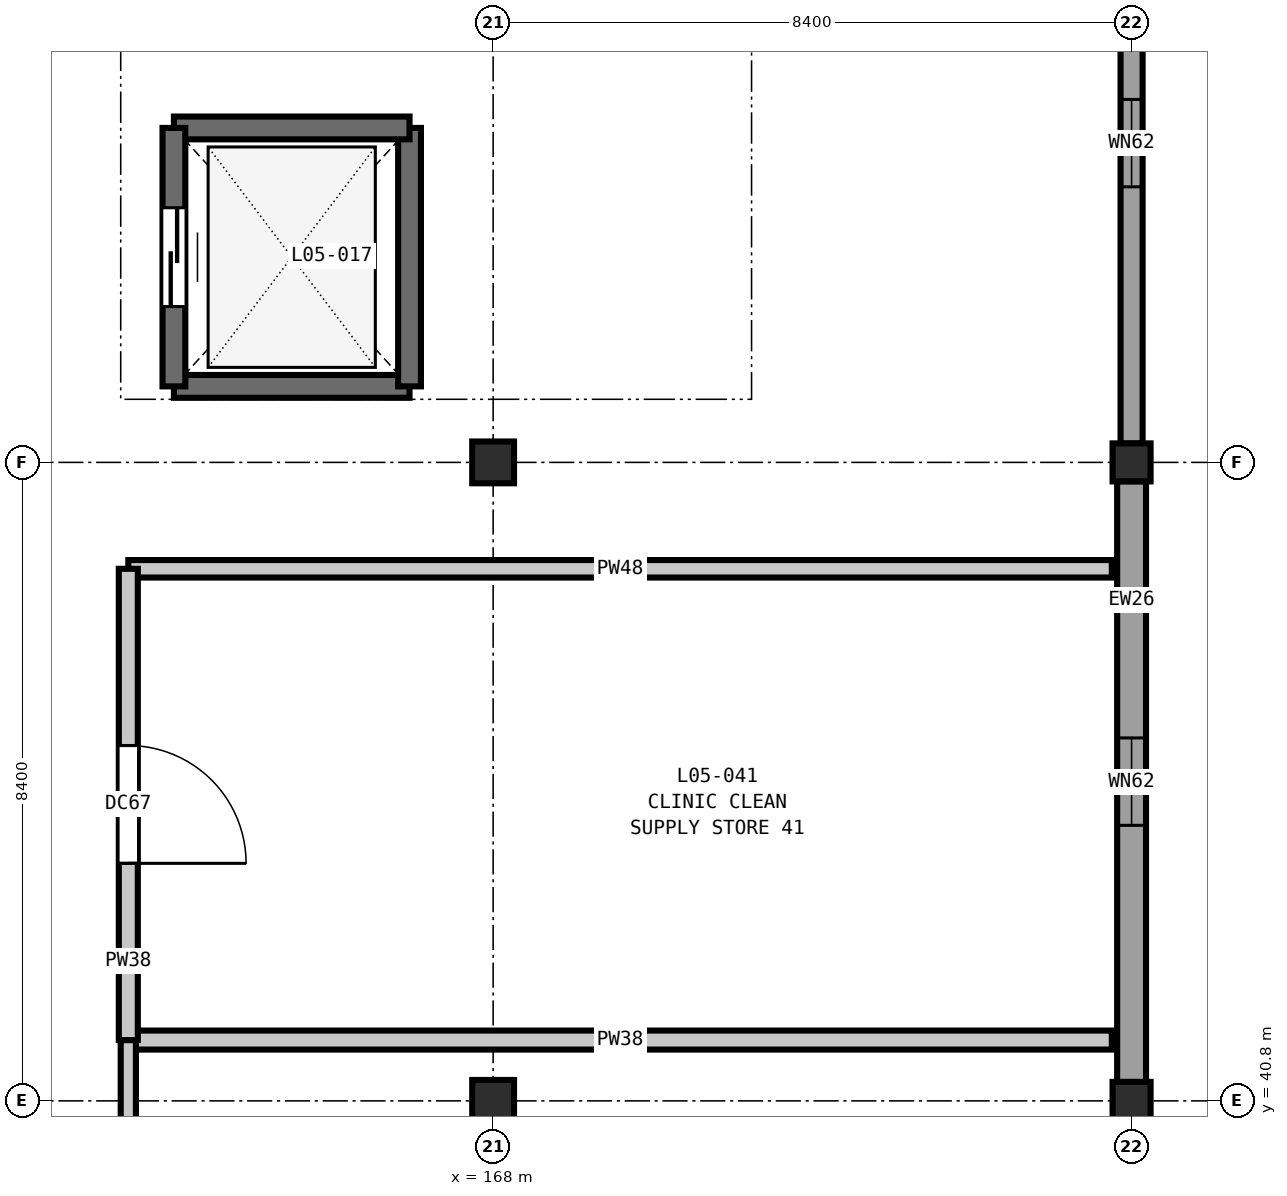
"""IFC4 building model, lengths in metres.
Left out: names, types, materials, properties, quantities, classifications, styles, units other than length and angle.
Written with IfcOpenShell. Run it as: python <this file> out.ifc"""

import sys

from ifc_helpers import new_model, si_unit, direction, frame, frame_2d, origin, origin_2d, place, context, subcontext, project, spatial, rectangle, extrude, element, fill, save


model = new_model("IFC4")
c1 = context("Model", 3, precision=1e-05, world=origin(), true_north=direction((0.0, 1.0)))
c2 = subcontext(c1, "Body", "Model", "MODEL_VIEW")
j1 = project(units=[si_unit("LENGTHUNIT", "METRE"), si_unit("PLANEANGLEUNIT", "RADIAN")], contexts=[c1])
p1 = place(None, origin())
s1 = spatial("IfcSite", under=j1, at=p1, CompositionType="ELEMENT")
p2 = place(p1, origin())
s2 = spatial("IfcBuilding", under=s1, at=p2, CompositionType="ELEMENT")
p3 = place(p2, frame((0.0, 0.0, 24.6)))
s3 = spatial("IfcBuildingStorey", under=s2, at=p3, CompositionType="ELEMENT", Elevation=24.6)
for number, where, z_axis, x_axis in (
    (1, (168.0, 40.8, 0.0), (0.0, 0.0, 1.0), (1.0, 0.0, 0.0)),
    (2, (168.0, 49.2, 0.0), (0.0, 0.0, 1.0), (1.0, 0.0, 0.0)),
):
    element("IfcColumn", number, at=place(p3, frame(where, z_axis=z_axis, x_axis=x_axis)), inside=s3, PredefinedType="COLUMN", context=c2, shape_type="SweptSolid", body=[
        extrude(rectangle(XDim=0.55, YDim=0.55, at=origin_2d()), origin(), (0.0, 0.0, 1.0), 4.2),
    ])
for number, where, z_axis, x_axis in (
    (3, (176.4, 40.8, 0.0), (0.0, 0.0, 1.0), (1.0, 0.0, 0.0)),
    (4, (176.4, 49.2, 0.0), (0.0, 0.0, 1.0), (1.0, 0.0, 0.0)),
):
    element("IfcColumn", number, at=place(p3, frame(where, z_axis=z_axis, x_axis=x_axis)), inside=s3, PredefinedType="COLUMN", context=c2, shape_type="SweptSolid", body=[
        extrude(rectangle(XDim=0.5, YDim=0.5, at=origin_2d()), origin(), (0.0, 0.0, 1.0), 4.2),
    ])
p4 = place(p3, frame((176.4, 57.352, 0.0), z_axis=(0.0, 0.0, 1.0), x_axis=(0.0, -1.0, 0.0)))
e5 = element("IfcWall", 5, at=p4, inside=s3, PredefinedType="SOLIDWALL", context=c2, shape_type="SweptSolid", body=[
    extrude(rectangle(XDim=7.904, YDim=0.29, at=frame_2d((3.952, 0.0))), origin(), (0.0, 0.0, 1.0), 3.48),
])
p5 = place(p4, frame((3.377, 0.0, 0.9)))
e6 = element("IfcOpeningElement", 6, at=p5, cuts=e5, PredefinedType="OPENING", context=c2, shape_type="SweptSolid", body=[
    extrude(rectangle(XDim=1.15, YDim=1.4, at=frame_2d((0.575, 0.7))), frame((0.0, 0.155, 0.0), z_axis=(0.0, -1.0, 0.0), x_axis=(1.0, 0.0, 0.0)), (0.0, 0.0, 1.0), 0.31),
])
p6 = place(p3, frame((176.4, 48.952, 0.0), z_axis=(0.0, 0.0, 1.0), x_axis=(0.0, -1.0, 0.0)))
e7 = element("IfcWall", 7, at=p6, inside=s3, PredefinedType="SOLIDWALL", context=c2, shape_type="SweptSolid", body=[
    extrude(rectangle(XDim=7.904, YDim=0.38, at=frame_2d((3.952, 0.0))), origin(), (0.0, 0.0, 1.0), 3.48),
])
p7 = place(p6, frame((3.377, 0.0, 0.9)))
e8 = element("IfcOpeningElement", 8, at=p7, cuts=e7, PredefinedType="OPENING", context=c2, shape_type="SweptSolid", body=[
    extrude(rectangle(XDim=1.15, YDim=1.4, at=frame_2d((0.575, 0.7))), frame((0.0, 0.2, 0.0), z_axis=(0.0, -1.0, 0.0), x_axis=(1.0, 0.0, 0.0)), (0.0, 0.0, 1.0), 0.4),
])
p8 = place(p3, frame((163.8, 50.2, 0.0), z_axis=(0.0, 0.0, 1.0), x_axis=(1.0, 0.0, 0.0)))
e9 = element("IfcWall", 9, at=p8, inside=s3, PredefinedType="SHEAR", context=c2, shape_type="SweptSolid", body=[
    extrude(rectangle(XDim=3.1, YDim=0.3, at=frame_2d((1.55, 0.0))), origin(), (0.0, 0.0, 1.0), 4.2),
])
p9 = place(p3, frame((166.9, 50.2, 0.0), z_axis=(0.0, 0.0, 1.0), x_axis=(0.0, 1.0, 0.0)))
e10 = element("IfcWall", 10, at=p9, inside=s3, PredefinedType="SHEAR", context=c2, shape_type="SweptSolid", body=[
    extrude(rectangle(XDim=3.4, YDim=0.3, at=frame_2d((1.7, 0.0))), origin(), (0.0, 0.0, 1.0), 4.2),
])
p10 = place(p3, frame((166.9, 53.6, 0.0), z_axis=(0.0, 0.0, 1.0), x_axis=(-1.0, 0.0, 0.0)))
e11 = element("IfcWall", 11, at=p10, inside=s3, PredefinedType="SHEAR", context=c2, shape_type="SweptSolid", body=[
    extrude(rectangle(XDim=3.1, YDim=0.3, at=frame_2d((1.55, 0.0))), origin(), (0.0, 0.0, 1.0), 4.2),
])
p11 = place(p3, frame((163.8, 53.6, 0.0), z_axis=(0.0, 0.0, 1.0), x_axis=(0.0, -1.0, 0.0)))
e12 = element("IfcWall", 12, at=p11, inside=s3, PredefinedType="SHEAR", context=c2, shape_type="SweptSolid", body=[
    extrude(rectangle(XDim=3.4, YDim=0.3, at=frame_2d((1.7, 0.0))), origin(), (0.0, 0.0, 1.0), 4.2),
])
p12 = place(p11, frame((1.05, 0.0, 0.0)))
e13 = element("IfcOpeningElement", 13, at=p12, cuts=e12, PredefinedType="OPENING", context=c2, shape_type="SweptSolid", body=[
    extrude(rectangle(XDim=1.3, YDim=2.2, at=frame_2d((0.65, 1.1))), frame((0.0, 0.16, 0.0), z_axis=(0.0, -1.0, 0.0), x_axis=(1.0, 0.0, 0.0)), (0.0, 0.0, 1.0), 0.32),
])
p13 = place(p3, frame((163.2, 41.6, 0.0), z_axis=(0.0, 0.0, 1.0), x_axis=(1.0, 0.0, 0.0)))
e14 = element("IfcWall", 14, at=p13, inside=s3, PredefinedType="PARTITIONING", context=c2, shape_type="SweptSolid", body=[
    extrude(rectangle(XDim=12.94, YDim=0.25, at=frame_2d((6.47, 0.0))), origin(), (0.0, 0.0, 1.0), 3.92),
])
p14 = place(p3, frame((163.2, 47.8, 0.0), z_axis=(0.0, 0.0, 1.0), x_axis=(1.0, 0.0, 0.0)))
e15 = element("IfcWall", 15, at=p14, inside=s3, PredefinedType="PARTITIONING", context=c2, shape_type="SweptSolid", body=[
    extrude(rectangle(XDim=12.94, YDim=0.23, at=frame_2d((6.47, 0.0))), origin(), (0.0, 0.0, 1.0), 3.92),
])
p15 = place(p3, frame((163.2, 36.0, 0.0), z_axis=(0.0, 0.0, 1.0), x_axis=(0.0, 1.0, 0.0)))
e16 = element("IfcWall", 16, at=p15, inside=s3, PredefinedType="PARTITIONING", context=c2, shape_type="SweptSolid", body=[
    extrude(rectangle(XDim=5.6, YDim=0.2, at=frame_2d((2.8, 0.0))), origin(), (0.0, 0.0, 1.0), 3.92),
])
p16 = place(p15, frame((2.075, 0.0, 0.0)))
e17 = element("IfcOpeningElement", 17, at=p16, cuts=e16, PredefinedType="OPENING", context=c2, shape_type="SweptSolid", body=[
    extrude(rectangle(XDim=1.45, YDim=2.25, at=frame_2d((0.725, 1.125))), frame((0.0, 0.11, 0.0), z_axis=(0.0, -1.0, 0.0), x_axis=(1.0, 0.0, 0.0)), (0.0, 0.0, 1.0), 0.22),
])
p17 = place(p3, frame((163.2, 41.6, 0.0), z_axis=(0.0, 0.0, 1.0), x_axis=(0.0, 1.0, 0.0)))
e18 = element("IfcWall", 18, at=p17, inside=s3, PredefinedType="PARTITIONING", context=c2, shape_type="SweptSolid", body=[
    extrude(rectangle(XDim=6.2, YDim=0.25, at=frame_2d((3.1, 0.0))), origin(), (0.0, 0.0, 1.0), 3.92),
])
p18 = place(p17, frame((2.325, 0.0, 0.0)))
e19 = element("IfcOpeningElement", 19, at=p18, cuts=e18, PredefinedType="OPENING", context=c2, shape_type="SweptSolid", body=[
    extrude(rectangle(XDim=1.55, YDim=2.25, at=frame_2d((0.775, 1.125))), frame((0.0, 0.135, 0.0), z_axis=(0.0, -1.0, 0.0), x_axis=(1.0, 0.0, 0.0)), (0.0, 0.0, 1.0), 0.27),
])
p19 = place(p5, origin())
e20 = element("IfcWindow", 20, at=p19, inside=s3, PartitioningType="SINGLE_PANEL", PredefinedType="WINDOW", context=c2, shape_type="SweptSolid", body=[
    extrude(rectangle(XDim=1.15, YDim=1.4, at=frame_2d((0.575, 0.7))), frame((0.0, 0.03, 0.0), z_axis=(0.0, -1.0, 0.0), x_axis=(1.0, 0.0, 0.0)), (0.0, 0.0, 1.0), 0.06),
])
fill(e6, e20)
p20 = place(p7, origin())
e21 = element("IfcWindow", 21, at=p20, inside=s3, PartitioningType="SINGLE_PANEL", PredefinedType="WINDOW", context=c2, shape_type="SweptSolid", body=[
    extrude(rectangle(XDim=1.15, YDim=1.4, at=frame_2d((0.575, 0.7))), frame((0.0, 0.03, 0.0), z_axis=(0.0, -1.0, 0.0), x_axis=(1.0, 0.0, 0.0)), (0.0, 0.0, 1.0), 0.06),
])
fill(e8, e21)
p21 = place(p12, origin())
e22 = element("IfcDoor", 22, at=p21, inside=s3, OperationType="DOUBLE_DOOR_SLIDING", PredefinedType="DOOR", context=c2, shape_type="SweptSolid", body=[
    extrude(rectangle(XDim=1.3, YDim=2.2, at=frame_2d((0.65, 1.1))), frame((0.0, 0.025, 0.0), z_axis=(0.0, -1.0, 0.0), x_axis=(1.0, 0.0, 0.0)), (0.0, 0.0, 1.0), 0.05),
])
fill(e13, e22)
p22 = place(p18, frame((1.55, 0.0, 0.0), z_axis=(0.0, 0.0, 1.0), x_axis=(-1.0, 0.0, 0.0)))
e23 = element("IfcDoor", 23, at=p22, inside=s3, OperationType="SINGLE_SWING_RIGHT", PredefinedType="DOOR", context=c2, shape_type="SweptSolid", body=[
    extrude(rectangle(XDim=1.55, YDim=2.25, at=frame_2d((0.775, 1.125))), frame((0.0, 0.025, 0.0), z_axis=(0.0, -1.0, 0.0), x_axis=(1.0, 0.0, 0.0)), (0.0, 0.0, 1.0), 0.05),
])
fill(e19, e23)
save(model, sys.argv[1])
